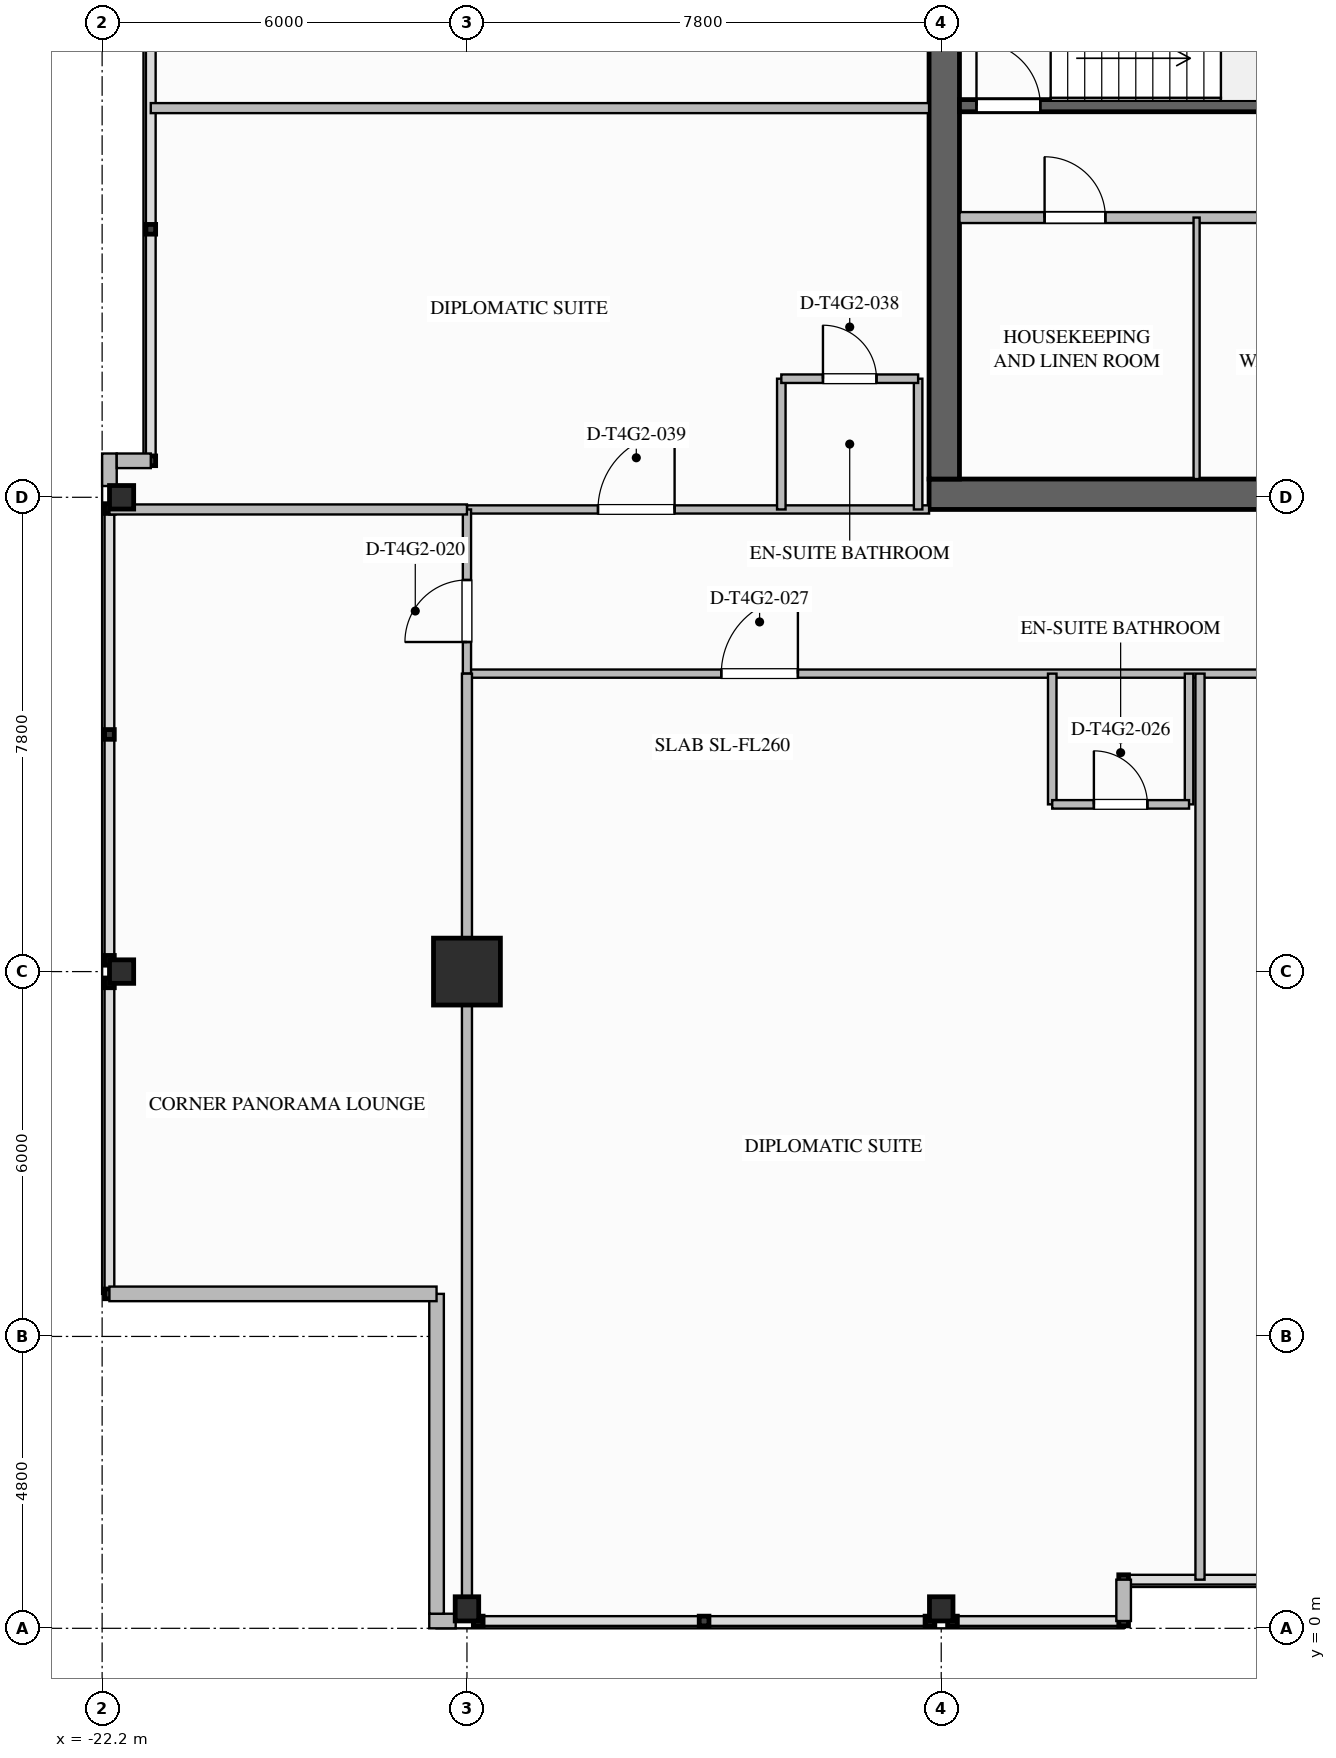
"""IFC4 building model, lengths in metres.
Left out: names, types, materials, properties, quantities, classifications, styles, units other than length and angle.
Written with IfcOpenShell. Run it as: python <this file> out.ifc"""

import sys

from ifc_helpers import new_model, si_unit, direction, frame, frame_2d, origin, origin_2d, place, context, subcontext, project, spatial, rectangle, i_section, extrude, element, fill, save


model = new_model("IFC4")
c1 = context("Model", 3, precision=1e-05, world=origin(), true_north=direction((0.0, 1.0)))
c2 = subcontext(c1, "Body", "Model", "MODEL_VIEW")
j1 = project(units=[si_unit("LENGTHUNIT", "METRE"), si_unit("PLANEANGLEUNIT", "RADIAN")], contexts=[c1])
p1 = place(None, origin())
s1 = spatial("IfcSite", under=j1, at=p1, CompositionType="ELEMENT")
p2 = place(p1, origin())
s2 = spatial("IfcBuilding", under=s1, at=p2, CompositionType="ELEMENT")
p3 = place(p2, frame((0.0, 0.0, 215.9)))
s3 = spatial("IfcBuildingStorey", under=s2, at=p3, CompositionType="ELEMENT", Elevation=215.9)
p4 = place(p3, frame((8.6, 18.65, 0.0), z_axis=(0.0, 0.0, 1.0), x_axis=(-1.0, 0.0, 0.0)))
e1 = element("IfcWall", 1, at=p4, inside=s3, PredefinedType="SHEAR", context=c2, shape_type="SweptSolid", body=[
    extrude(rectangle(XDim=17.2, YDim=0.5, at=frame_2d((8.6, 0.0))), origin(), (0.0, 0.0, 1.0), 3.6),
])
p5 = place(p3, frame((-8.35, 18.9, 0.0), z_axis=(0.0, 0.0, 1.0), x_axis=(0.0, 1.0, 0.0)))
e2 = element("IfcWall", 2, at=p5, inside=s3, PredefinedType="SHEAR", context=c2, shape_type="SweptSolid", body=[
    extrude(rectangle(XDim=16.2, YDim=0.5, at=frame_2d((8.1, 0.0))), origin(), (0.0, 0.0, 1.0), 3.6),
])
p6 = place(p3, frame((-16.2, 10.8, 0.0), z_axis=(0.0, 0.0, 1.0), x_axis=(1.0, 0.0, 0.0)))
e3 = element("IfcColumn", 3, at=p6, inside=s3, PredefinedType="COLUMN", context=c2, shape_type="SweptSolid", body=[
    extrude(rectangle(XDim=1.1, YDim=1.1, at=origin_2d()), origin(), (0.0, 0.0, 1.0), 3.6),
])
for number, where, z_axis, x_axis in (
    (4, (-21.88, 10.8, 0.0), (0.0, 0.0, 1.0), (1.0, 0.0, 0.0)),
    (5, (-21.88, 18.6, 0.0), (0.0, 0.0, 1.0), (1.0, 0.0, 0.0)),
    (6, (-16.2, 0.32, 0.0), (0.0, 0.0, 1.0), (0.0, 1.0, 0.0)),
    (7, (-8.4, 0.32, 0.0), (0.0, 0.0, 1.0), (0.0, 1.0, 0.0)),
):
    element("IfcColumn", number, at=place(p3, frame(where, z_axis=z_axis, x_axis=x_axis)), inside=s3, PredefinedType="COLUMN", context=c2, shape_type="SweptSolid", body=[
        extrude(i_section(OverallWidth=0.397, OverallDepth=0.387, WebThickness=0.021, FlangeThickness=0.033, FilletRadius=0.025, at=origin_2d()), origin(), (0.0, 0.0, 1.0), 3.597),
    ])
p7 = place(p3, frame((-22.08, 18.785, 0.0), z_axis=(0.0, 0.0, 1.0), x_axis=(0.0, 1.0, 0.0)))
e8 = element("IfcWall", 8, at=p7, inside=s3, PredefinedType="STANDARD", context=c2, shape_type="SweptSolid", body=[
    extrude(rectangle(XDim=0.535, YDim=0.24, at=frame_2d((0.267, 0.0))), origin(), (0.0, 0.0, 1.0), 3.34),
])
p8 = place(p3, frame((-16.385, 0.12, 0.0), z_axis=(0.0, 0.0, 1.0), x_axis=(-1.0, 0.0, 0.0)))
e9 = element("IfcWall", 9, at=p8, inside=s3, PredefinedType="STANDARD", context=c2, shape_type="SweptSolid", body=[
    extrude(rectangle(XDim=0.435, YDim=0.24, at=frame_2d((0.217, 0.0))), origin(), (0.0, 0.0, 1.0), 3.34),
])
p9 = place(p3, frame((-16.7, 0.24, 0.0), z_axis=(0.0, 0.0, 1.0), x_axis=(0.0, 1.0, 0.0)))
e10 = element("IfcWall", 10, at=p9, inside=s3, PredefinedType="STANDARD", context=c2, shape_type="SweptSolid", body=[
    extrude(rectangle(XDim=5.26, YDim=0.24, at=frame_2d((2.63, 0.0))), origin(), (0.0, 0.0, 1.0), 3.34),
])
p10 = place(p3, frame((-16.7, 5.5, 0.0), z_axis=(0.0, 0.0, 1.0), x_axis=(-1.0, 0.0, 0.0)))
e11 = element("IfcWall", 11, at=p10, inside=s3, PredefinedType="STANDARD", context=c2, shape_type="SweptSolid", body=[
    extrude(rectangle(XDim=5.38, YDim=0.24, at=frame_2d((2.69, 0.0))), origin(), (0.0, 0.0, 1.0), 3.34),
])
p11 = place(p3, frame((-21.96, 19.2, 0.0), z_axis=(0.0, 0.0, 1.0), x_axis=(1.0, 0.0, 0.0)))
e12 = element("IfcWall", 12, at=p11, inside=s3, PredefinedType="STANDARD", context=c2, shape_type="SweptSolid", body=[
    extrude(rectangle(XDim=0.56, YDim=0.24, at=frame_2d((0.28, 0.0))), origin(), (0.0, 0.0, 1.0), 3.34),
])
p12 = place(p3, frame((-5.4, 0.8, 0.0), z_axis=(0.0, 0.0, 1.0), x_axis=(0.0, -1.0, 0.0)))
e13 = element("IfcWall", 13, at=p12, inside=s3, PredefinedType="STANDARD", context=c2, shape_type="SweptSolid", body=[
    extrude(rectangle(XDim=0.68, YDim=0.24, at=frame_2d((0.34, 0.0))), origin(), (0.0, 0.0, 1.0), 3.34),
])
p13 = place(p3, frame((-8.1, 25.04, 0.0), z_axis=(0.0, 0.0, 1.0), x_axis=(1.0, 0.0, 0.0)))
e14 = element("IfcWall", 14, at=p13, inside=s3, PredefinedType="SOLIDWALL", context=c2, shape_type="SweptSolid", body=[
    extrude(rectangle(XDim=8.1, YDim=0.2, at=frame_2d((4.05, 0.0))), origin(), (0.0, 0.0, 1.0), 3.34),
])
p14 = place(p13, frame((0.28, 0.0, 0.0)))
e15 = element("IfcOpeningElement", 15, at=p14, cuts=e14, PredefinedType="OPENING", context=c2, shape_type="SweptSolid", body=[
    extrude(rectangle(XDim=1.05, YDim=2.1, at=frame_2d((0.525, 1.05))), frame((0.0, 0.11, 0.0), z_axis=(0.0, -1.0, 0.0), x_axis=(1.0, 0.0, 0.0)), (0.0, 0.0, 1.0), 0.22),
])
p15 = place(p3, frame((-8.1, 23.2, 0.0), z_axis=(0.0, 0.0, 1.0), x_axis=(1.0, 0.0, 0.0)))
e16 = element("IfcWall", 16, at=p15, inside=s3, PredefinedType="SOLIDWALL", context=c2, shape_type="SweptSolid", body=[
    extrude(rectangle(XDim=16.2, YDim=0.18, at=frame_2d((8.1, 0.0))), origin(), (0.0, 0.0, 1.0), 3.34),
])
p16 = place(p15, frame((1.4, 0.0, 0.0)))
e17 = element("IfcOpeningElement", 17, at=p16, cuts=e16, PredefinedType="OPENING", context=c2, shape_type="SweptSolid", body=[
    extrude(rectangle(XDim=1.0, YDim=2.1, at=frame_2d((0.5, 1.05))), frame((0.0, 0.1, 0.0), z_axis=(0.0, -1.0, 0.0), x_axis=(1.0, 0.0, 0.0)), (0.0, 0.0, 1.0), 0.2),
])
p17 = place(p15, frame((5.6, 0.0, 0.0)))
e18 = element("IfcOpeningElement", 18, at=p17, cuts=e16, PredefinedType="OPENING", context=c2, shape_type="SweptSolid", body=[
    extrude(rectangle(XDim=1.0, YDim=2.1, at=frame_2d((0.5, 1.05))), frame((0.0, 0.1, 0.0), z_axis=(0.0, -1.0, 0.0), x_axis=(1.0, 0.0, 0.0)), (0.0, 0.0, 1.0), 0.2),
])
p18 = place(p15, frame((9.8, 0.0, 0.0)))
e19 = element("IfcOpeningElement", 19, at=p18, cuts=e16, PredefinedType="OPENING", context=c2, shape_type="SweptSolid", body=[
    extrude(rectangle(XDim=0.92, YDim=2.1, at=frame_2d((0.46, 1.05))), frame((0.0, 0.1, 0.0), z_axis=(0.0, -1.0, 0.0), x_axis=(1.0, 0.0, 0.0)), (0.0, 0.0, 1.0), 0.2),
])
p19 = place(p15, frame((13.8, 0.0, 0.0)))
e20 = element("IfcOpeningElement", 20, at=p19, cuts=e16, PredefinedType="OPENING", context=c2, shape_type="SweptSolid", body=[
    extrude(rectangle(XDim=1.0, YDim=2.1, at=frame_2d((0.5, 1.05))), frame((0.0, 0.1, 0.0), z_axis=(0.0, -1.0, 0.0), x_axis=(1.0, 0.0, 0.0)), (0.0, 0.0, 1.0), 0.2),
])
p20 = place(p3, frame((-4.2, 18.9, 0.0), z_axis=(0.0, 0.0, 1.0), x_axis=(0.0, 1.0, 0.0)))
e21 = element("IfcWall", 21, at=p20, inside=s3, PredefinedType="PARTITIONING", context=c2, shape_type="SweptSolid", body=[
    extrude(rectangle(XDim=4.3, YDim=0.1, at=frame_2d((2.15, 0.0))), origin(), (0.0, 0.0, 1.0), 3.34),
])
p21 = place(p3, frame((-16.2, 15.7, 0.0), z_axis=(0.0, 0.0, 1.0), x_axis=(1.0, 0.0, 0.0)))
e22 = element("IfcWall", 22, at=p21, inside=s3, PredefinedType="PARTITIONING", context=c2, shape_type="SweptSolid", body=[
    extrude(rectangle(XDim=38.28, YDim=0.135, at=frame_2d((19.14, 0.0))), origin(), (0.0, 0.0, 1.0), 3.34),
])
p22 = place(p21, frame((33.355, 0.0, 0.0)))
e23 = element("IfcOpeningElement", 23, at=p22, cuts=e22, PredefinedType="OPENING", context=c2, shape_type="SweptSolid", body=[
    extrude(rectangle(XDim=1.26, YDim=2.2, at=frame_2d((0.63, 1.1))), frame((0.0, 0.077, 0.0), z_axis=(0.0, -1.0, 0.0), x_axis=(1.0, 0.0, 0.0)), (0.0, 0.0, 1.0), 0.155),
])
p23 = place(p21, frame((4.183, 0.0, 0.0)))
e24 = element("IfcOpeningElement", 24, at=p23, cuts=e22, PredefinedType="OPENING", context=c2, shape_type="SweptSolid", body=[
    extrude(rectangle(XDim=1.26, YDim=2.2, at=frame_2d((0.63, 1.1))), frame((0.0, 0.077, 0.0), z_axis=(0.0, -1.0, 0.0), x_axis=(1.0, 0.0, 0.0)), (0.0, 0.0, 1.0), 0.155),
])
p24 = place(p21, frame((15.947, 0.0, 0.0)))
e25 = element("IfcOpeningElement", 25, at=p24, cuts=e22, PredefinedType="OPENING", context=c2, shape_type="SweptSolid", body=[
    extrude(rectangle(XDim=1.26, YDim=2.2, at=frame_2d((0.63, 1.1))), frame((0.0, 0.077, 0.0), z_axis=(0.0, -1.0, 0.0), x_axis=(1.0, 0.0, 0.0)), (0.0, 0.0, 1.0), 0.155),
])
p25 = place(p21, frame((24.904, 0.0, 0.0)))
e26 = element("IfcOpeningElement", 26, at=p25, cuts=e22, PredefinedType="OPENING", context=c2, shape_type="SweptSolid", body=[
    extrude(rectangle(XDim=1.26, YDim=2.2, at=frame_2d((0.63, 1.1))), frame((0.0, 0.077, 0.0), z_axis=(0.0, -1.0, 0.0), x_axis=(1.0, 0.0, 0.0)), (0.0, 0.0, 1.0), 0.155),
])
p26 = place(p3, frame((-16.2, 18.4, 0.0), z_axis=(0.0, 0.0, 1.0), x_axis=(1.0, 0.0, 0.0)))
e27 = element("IfcWall", 27, at=p26, inside=s3, PredefinedType="PARTITIONING", context=c2, shape_type="SweptSolid", body=[
    extrude(rectangle(XDim=7.6, YDim=0.135, at=frame_2d((3.8, 0.0))), origin(), (0.0, 0.0, 1.0), 2.718),
])
p27 = place(p26, frame((2.155, 0.0, 0.0)))
e28 = element("IfcOpeningElement", 28, at=p27, cuts=e27, PredefinedType="OPENING", context=c2, shape_type="SweptSolid", body=[
    extrude(rectangle(XDim=1.26, YDim=2.2, at=frame_2d((0.63, 1.1))), frame((0.0, 0.077, 0.0), z_axis=(0.0, -1.0, 0.0), x_axis=(1.0, 0.0, 0.0)), (0.0, 0.0, 1.0), 0.155),
])
p28 = place(p3, frame((-16.2, 15.7, 0.0), z_axis=(0.0, 0.0, 1.0), x_axis=(0.0, 1.0, 0.0)))
e29 = element("IfcWall", 29, at=p28, inside=s3, PredefinedType="PARTITIONING", context=c2, shape_type="SweptSolid", body=[
    extrude(rectangle(XDim=2.7, YDim=0.135, at=frame_2d((1.35, 0.0))), origin(), (0.0, 0.0, 1.0), 2.714),
])
p29 = place(p28, frame((0.52, 0.0, 0.0)))
e30 = element("IfcOpeningElement", 30, at=p29, cuts=e29, PredefinedType="OPENING", context=c2, shape_type="SweptSolid", body=[
    extrude(rectangle(XDim=1.02, YDim=2.15, at=frame_2d((0.51, 1.075))), frame((0.0, 0.077, 0.0), z_axis=(0.0, -1.0, 0.0), x_axis=(1.0, 0.0, 0.0)), (0.0, 0.0, 1.0), 0.155),
])
p30 = place(p3, frame((-16.2, 0.12, 0.0), z_axis=(0.0, 0.0, 1.0), x_axis=(0.0, 1.0, 0.0)))
e31 = element("IfcWall", 31, at=p30, inside=s3, PredefinedType="PARTITIONING", context=c2, shape_type="SweptSolid", body=[
    extrude(rectangle(XDim=15.58, YDim=0.165, at=frame_2d((7.79, 0.0))), origin(), (0.0, 0.0, 1.0), 2.714),
])
p31 = place(p3, frame((-22.08, 18.4, 0.0), z_axis=(0.0, 0.0, 1.0), x_axis=(1.0, 0.0, 0.0)))
e32 = element("IfcWall", 32, at=p31, inside=s3, PredefinedType="PARTITIONING", context=c2, shape_type="SweptSolid", body=[
    extrude(rectangle(XDim=5.88, YDim=0.165, at=frame_2d((2.94, 0.0))), origin(), (0.0, 0.0, 1.0), 2.714),
])
for number, where, z_axis, x_axis in (
    (33, (-6.574, 15.7, 0.0), (0.0, 0.0, 1.0), (0.0, -1.0, 0.0)),
    (34, (-4.324, 15.7, 0.0), (0.0, 0.0, 1.0), (0.0, -1.0, 0.0)),
):
    element("IfcWall", number, at=place(p3, frame(where, z_axis=z_axis, x_axis=x_axis)), inside=s3, PredefinedType="PLUMBINGWALL", context=c2, shape_type="SweptSolid", body=[
        extrude(rectangle(XDim=2.15, YDim=0.14, at=frame_2d((1.075, 0.0))), origin(), (0.0, 0.0, 1.0), 3.34),
    ])
p32 = place(p3, frame((-6.574, 13.55, 0.0), z_axis=(0.0, 0.0, 1.0), x_axis=(1.0, 0.0, 0.0)))
e35 = element("IfcWall", 35, at=p32, inside=s3, PredefinedType="PLUMBINGWALL", context=c2, shape_type="SweptSolid", body=[
    extrude(rectangle(XDim=2.25, YDim=0.14, at=frame_2d((1.125, 0.0))), origin(), (0.0, 0.0, 1.0), 3.34),
])
p33 = place(p32, frame((0.685, 0.0, 0.0)))
e36 = element("IfcOpeningElement", 36, at=p33, cuts=e35, PredefinedType="OPENING", context=c2, shape_type="SweptSolid", body=[
    extrude(rectangle(XDim=0.88, YDim=2.1, at=frame_2d((0.44, 1.05))), frame((0.0, 0.08, 0.0), z_axis=(0.0, -1.0, 0.0), x_axis=(1.0, 0.0, 0.0)), (0.0, 0.0, 1.0), 0.16),
])
p34 = place(p3, frame((-4.144, 0.8, 0.0), z_axis=(0.0, 0.0, 1.0), x_axis=(0.0, 1.0, 0.0)))
e37 = element("IfcWall", 37, at=p34, inside=s3, PredefinedType="PARTITIONING", context=c2, shape_type="SweptSolid", body=[
    extrude(rectangle(XDim=14.9, YDim=0.15, at=frame_2d((7.45, 0.0))), origin(), (0.0, 0.0, 1.0), 3.34),
])
p35 = place(p3, frame((-21.4, 25.0, 0.0), z_axis=(0.0, 0.0, 1.0), x_axis=(1.0, 0.0, 0.0)))
e38 = element("IfcWall", 38, at=p35, inside=s3, PredefinedType="PARTITIONING", context=c2, shape_type="SweptSolid", body=[
    extrude(rectangle(XDim=12.8, YDim=0.165, at=frame_2d((6.4, 0.0))), origin(), (0.0, 0.0, 1.0), 3.34),
])
for number, where, z_axis, x_axis in (
    (39, (-11.03, 18.4, 0.0), (0.0, 0.0, 1.0), (0.0, 1.0, 0.0)),
    (40, (-8.78, 18.4, 0.0), (0.0, 0.0, 1.0), (0.0, 1.0, 0.0)),
):
    element("IfcWall", number, at=place(p3, frame(where, z_axis=z_axis, x_axis=x_axis)), inside=s3, PredefinedType="PLUMBINGWALL", context=c2, shape_type="SweptSolid", body=[
        extrude(rectangle(XDim=2.15, YDim=0.14, at=frame_2d((1.075, 0.0))), origin(), (0.0, 0.0, 1.0), 3.34),
    ])
p36 = place(p3, frame((-11.03, 20.55, 0.0), z_axis=(0.0, 0.0, 1.0), x_axis=(1.0, 0.0, 0.0)))
e41 = element("IfcWall", 41, at=p36, inside=s3, PredefinedType="PLUMBINGWALL", context=c2, shape_type="SweptSolid", body=[
    extrude(rectangle(XDim=2.25, YDim=0.14, at=frame_2d((1.125, 0.0))), origin(), (0.0, 0.0, 1.0), 3.34),
])
p37 = place(p36, frame((0.685, 0.0, 0.0)))
e42 = element("IfcOpeningElement", 42, at=p37, cuts=e41, PredefinedType="OPENING", context=c2, shape_type="SweptSolid", body=[
    extrude(rectangle(XDim=0.88, YDim=2.1, at=frame_2d((0.44, 1.05))), frame((0.0, 0.08, 0.0), z_axis=(0.0, -1.0, 0.0), x_axis=(1.0, 0.0, 0.0)), (0.0, 0.0, 1.0), 0.16),
])
p38 = place(p14, origin())
e43 = element("IfcDoor", 43, at=p38, inside=s3, OperationType="SINGLE_SWING_LEFT", PredefinedType="DOOR", context=c2, shape_type="SweptSolid", body=[
    extrude(rectangle(XDim=1.05, YDim=2.1, at=frame_2d((0.525, 1.05))), frame((0.0, 0.025, 0.0), z_axis=(0.0, -1.0, 0.0), x_axis=(1.0, 0.0, 0.0)), (0.0, 0.0, 1.0), 0.05),
])
fill(e15, e43)
p39 = place(p16, origin())
e44 = element("IfcDoor", 44, at=p39, inside=s3, OperationType="SINGLE_SWING_LEFT", PredefinedType="DOOR", context=c2, shape_type="SweptSolid", body=[
    extrude(rectangle(XDim=1.0, YDim=2.1, at=frame_2d((0.5, 1.05))), frame((0.0, 0.025, 0.0), z_axis=(0.0, -1.0, 0.0), x_axis=(1.0, 0.0, 0.0)), (0.0, 0.0, 1.0), 0.05),
])
fill(e17, e44)
p40 = place(p29, origin())
e45 = element("IfcDoor", 45, at=p40, inside=s3, OperationType="SINGLE_SWING_LEFT", PredefinedType="DOOR", context=c2, shape_type="SweptSolid", body=[
    extrude(rectangle(XDim=1.02, YDim=2.15, at=frame_2d((0.51, 1.075))), frame((0.0, 0.025, 0.0), z_axis=(0.0, -1.0, 0.0), x_axis=(1.0, 0.0, 0.0)), (0.0, 0.0, 1.0), 0.05),
])
fill(e30, e45)
p41 = place(p33, origin())
e46 = element("IfcDoor", 46, at=p41, inside=s3, OperationType="SINGLE_SWING_LEFT", PredefinedType="DOOR", context=c2, shape_type="SweptSolid", body=[
    extrude(rectangle(XDim=0.88, YDim=2.1, at=frame_2d((0.44, 1.05))), frame((0.0, 0.025, 0.0), z_axis=(0.0, -1.0, 0.0), x_axis=(1.0, 0.0, 0.0)), (0.0, 0.0, 1.0), 0.05),
])
fill(e36, e46)
p42 = place(p23, origin())
e47 = element("IfcDoor", 47, at=p42, inside=s3, OperationType="SINGLE_SWING_RIGHT", PredefinedType="DOOR", context=c2, shape_type="SweptSolid", body=[
    extrude(rectangle(XDim=1.26, YDim=2.2, at=frame_2d((0.63, 1.1))), frame((0.0, 0.025, 0.0), z_axis=(0.0, -1.0, 0.0), x_axis=(1.0, 0.0, 0.0)), (0.0, 0.0, 1.0), 0.05),
])
fill(e24, e47)
p43 = place(p37, origin())
e48 = element("IfcDoor", 48, at=p43, inside=s3, OperationType="SINGLE_SWING_LEFT", PredefinedType="DOOR", context=c2, shape_type="SweptSolid", body=[
    extrude(rectangle(XDim=0.88, YDim=2.1, at=frame_2d((0.44, 1.05))), frame((0.0, 0.025, 0.0), z_axis=(0.0, -1.0, 0.0), x_axis=(1.0, 0.0, 0.0)), (0.0, 0.0, 1.0), 0.05),
])
fill(e42, e48)
p44 = place(p27, origin())
e49 = element("IfcDoor", 49, at=p44, inside=s3, OperationType="SINGLE_SWING_RIGHT", PredefinedType="DOOR", context=c2, shape_type="SweptSolid", body=[
    extrude(rectangle(XDim=1.26, YDim=2.2, at=frame_2d((0.63, 1.1))), frame((0.0, 0.025, 0.0), z_axis=(0.0, -1.0, 0.0), x_axis=(1.0, 0.0, 0.0)), (0.0, 0.0, 1.0), 0.05),
])
fill(e28, e49)
save(model, sys.argv[1])
